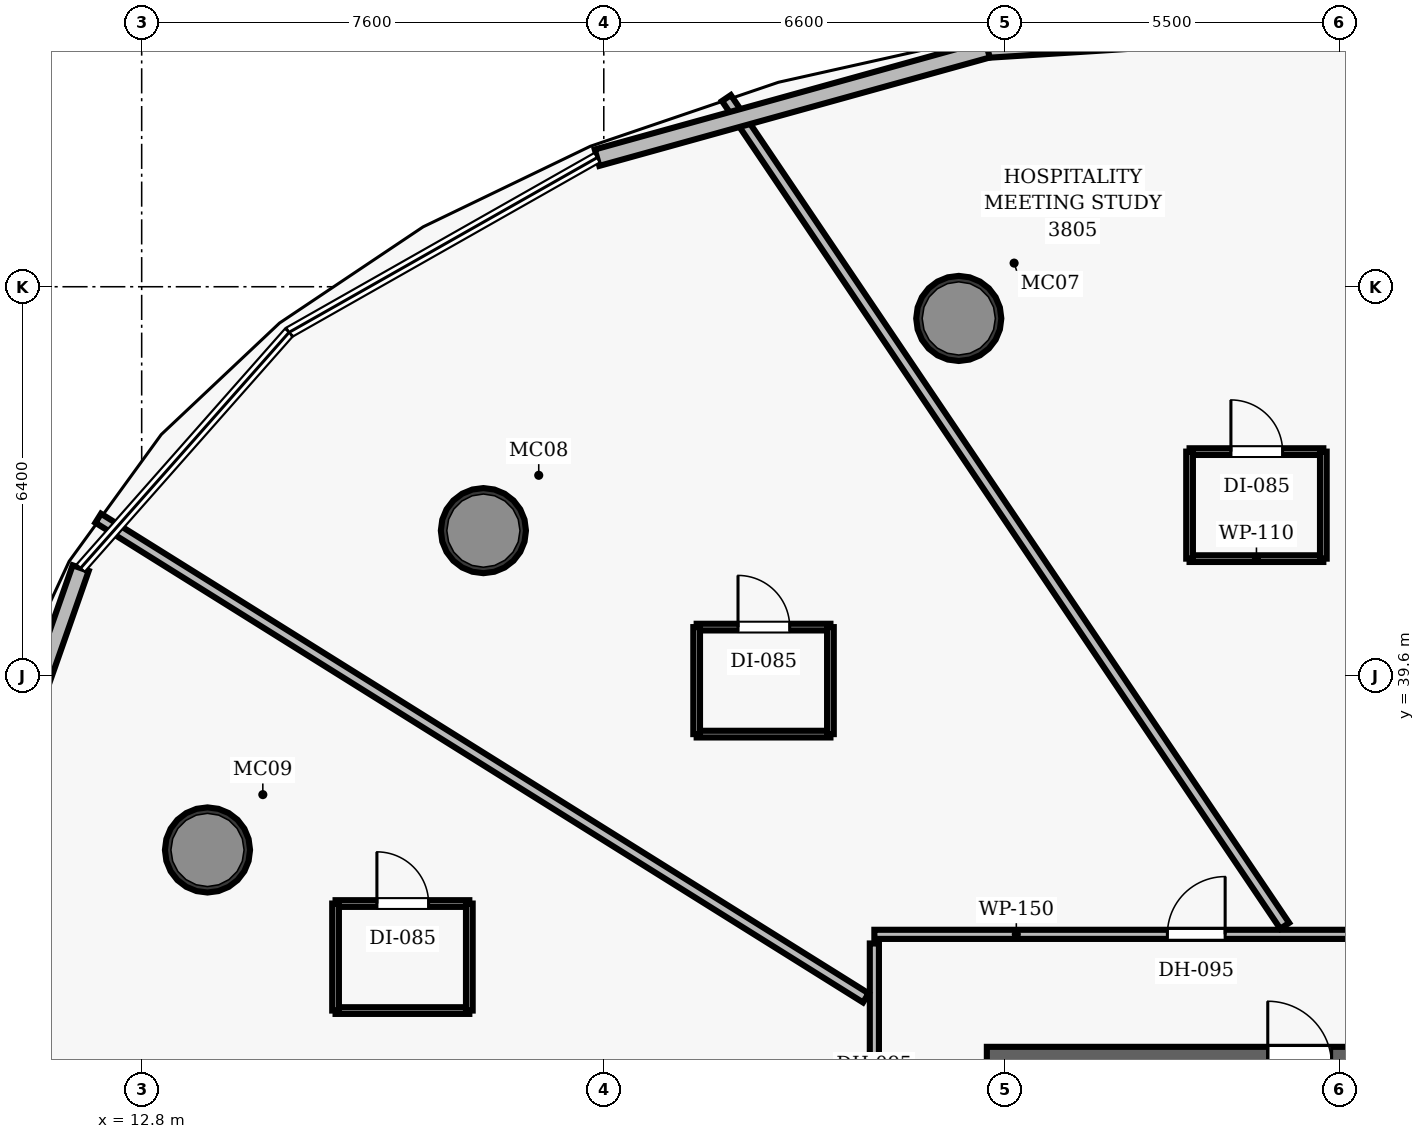
"""IFC4 building model, lengths in metres.
Left out: names, types, materials, properties, quantities, classifications, styles, units other than length and angle.
Written with IfcOpenShell. Run it as: python <this file> out.ifc"""

import sys

from ifc_helpers import new_model, si_unit, direction, frame, frame_2d, origin, origin_2d, place, context, subcontext, project, spatial, rectangle, hollow_circle, extrude, element, fill, save


model = new_model("IFC4")
c1 = context("Model", 3, precision=1e-05, world=origin(), true_north=direction((0.0, 1.0)))
c2 = subcontext(c1, "Body", "Model", "MODEL_VIEW")
j1 = project(units=[si_unit("LENGTHUNIT", "METRE"), si_unit("PLANEANGLEUNIT", "RADIAN")], contexts=[c1])
p1 = place(None, origin())
s1 = spatial("IfcSite", under=j1, at=p1, CompositionType="ELEMENT")
p2 = place(p1, origin())
s2 = spatial("IfcBuilding", under=s1, at=p2, CompositionType="ELEMENT")
p3 = place(p2, frame((0.0, 0.0, 151.8)))
s3 = spatial("IfcBuildingStorey", under=s2, at=p3, CompositionType="ELEMENT", Elevation=151.8)
p4 = place(p3, frame((26.7, 33.2, 0.0), z_axis=(0.0, 0.0, 1.0), x_axis=(1.0, 0.0, 0.0)))
e1 = element("IfcWall", 1, at=p4, inside=s3, PredefinedType="SHEAR", context=c2, shape_type="SweptSolid", body=[
    extrude(rectangle(XDim=22.6, YDim=0.6, at=frame_2d((11.3, 0.0))), origin(), (0.0, 0.0, 1.0), 3.5),
])
p5 = place(p4, frame((4.62, 0.0, 0.0)))
e2 = element("IfcOpeningElement", 2, at=p5, cuts=e1, PredefinedType="OPENING", context=c2, shape_type="SweptSolid", body=[
    extrude(rectangle(XDim=1.05, YDim=2.15, at=frame_2d((0.525, 1.075))), frame((0.0, 0.31, 0.0), z_axis=(0.0, -1.0, 0.0), x_axis=(1.0, 0.0, 0.0)), (0.0, 0.0, 1.0), 0.62),
])
p6 = place(p4, frame((14.52, 0.0, 0.0)))
e3 = element("IfcOpeningElement", 3, at=p6, cuts=e1, PredefinedType="OPENING", context=c2, shape_type="SweptSolid", body=[
    extrude(rectangle(XDim=1.05, YDim=2.15, at=frame_2d((0.525, 1.075))), frame((0.0, 0.31, 0.0), z_axis=(0.0, -1.0, 0.0), x_axis=(1.0, 0.0, 0.0)), (0.0, 0.0, 1.0), 0.62),
])
for number, where, z_axis, x_axis in (
    (4, (26.238, 45.479, 0.0), (0.0, 0.0, 1.0), (1.0, 0.0, 0.0)),
    (5, (18.42, 41.989, 0.0), (0.0, 0.0, 1.0), (1.0, 0.0, 0.0)),
    (6, (13.882, 36.738, 0.0), (0.0, 0.0, 1.0), (1.0, 0.0, 0.0)),
):
    element("IfcColumn", number, at=place(p3, frame(where, z_axis=z_axis, x_axis=x_axis)), inside=s3, PredefinedType="COLUMN", context=c2, shape_type="SweptSolid", body=[
        extrude(hollow_circle(Radius=0.7, WallThickness=0.055, at=origin_2d()), origin(), (0.0, 0.0, 1.0), 3.5),
    ])
p7 = place(p3, frame((24.85, 35.35, 0.0), z_axis=(0.0, 0.0, 1.0), x_axis=(1.0, 0.0, 0.0)))
e7 = element("IfcWall", 7, at=p7, inside=s3, PredefinedType="PARTITIONING", context=c2, shape_type="SweptSolid", body=[
    extrude(rectangle(XDim=26.0, YDim=0.15, at=frame_2d((13.0, 0.0))), origin(), (0.0, 0.0, 1.0), 2.675),
])
p8 = place(p7, frame((21.789, 0.0, 0.0)))
e8 = element("IfcOpeningElement", 8, at=p8, cuts=e7, PredefinedType="OPENING", context=c2, shape_type="SweptSolid", body=[
    extrude(rectangle(XDim=0.95, YDim=2.15, at=frame_2d((0.475, 1.075))), frame((0.0, 0.085, 0.0), z_axis=(0.0, -1.0, 0.0), x_axis=(1.0, 0.0, 0.0)), (0.0, 0.0, 1.0), 0.17),
])
p9 = place(p7, frame((16.151, 0.0, 0.0)))
e9 = element("IfcOpeningElement", 9, at=p9, cuts=e7, PredefinedType="OPENING", context=c2, shape_type="SweptSolid", body=[
    extrude(rectangle(XDim=0.95, YDim=2.15, at=frame_2d((0.475, 1.075))), frame((0.0, 0.085, 0.0), z_axis=(0.0, -1.0, 0.0), x_axis=(1.0, 0.0, 0.0)), (0.0, 0.0, 1.0), 0.17),
])
p10 = place(p7, frame((13.021, 0.0, 0.0)))
e10 = element("IfcOpeningElement", 10, at=p10, cuts=e7, PredefinedType="OPENING", context=c2, shape_type="SweptSolid", body=[
    extrude(rectangle(XDim=0.95, YDim=2.15, at=frame_2d((0.475, 1.075))), frame((0.0, 0.085, 0.0), z_axis=(0.0, -1.0, 0.0), x_axis=(1.0, 0.0, 0.0)), (0.0, 0.0, 1.0), 0.17),
])
p11 = place(p7, frame((9.972, 0.0, 0.0)))
e11 = element("IfcOpeningElement", 11, at=p11, cuts=e7, PredefinedType="OPENING", context=c2, shape_type="SweptSolid", body=[
    extrude(rectangle(XDim=0.95, YDim=2.15, at=frame_2d((0.475, 1.075))), frame((0.0, 0.085, 0.0), z_axis=(0.0, -1.0, 0.0), x_axis=(1.0, 0.0, 0.0)), (0.0, 0.0, 1.0), 0.17),
])
p12 = place(p7, frame((4.819, 0.0, 0.0)))
e12 = element("IfcOpeningElement", 12, at=p12, cuts=e7, PredefinedType="OPENING", context=c2, shape_type="SweptSolid", body=[
    extrude(rectangle(XDim=0.95, YDim=2.15, at=frame_2d((0.475, 1.075))), frame((0.0, 0.085, 0.0), z_axis=(0.0, -1.0, 0.0), x_axis=(1.0, 0.0, 0.0)), (0.0, 0.0, 1.0), 0.17),
])
p13 = place(p3, frame((24.85, 27.08, 0.0), z_axis=(0.0, 0.0, 1.0), x_axis=(0.0, 1.0, 0.0)))
e13 = element("IfcWall", 13, at=p13, inside=s3, PredefinedType="PARTITIONING", context=c2, shape_type="SweptSolid", body=[
    extrude(rectangle(XDim=8.12, YDim=0.15, at=frame_2d((4.06, 0.0))), origin(), (0.0, 0.0, 1.0), 2.675),
])
p14 = place(p13, frame((4.58, 0.0, 0.0)))
e14 = element("IfcOpeningElement", 14, at=p14, cuts=e13, PredefinedType="OPENING", context=c2, shape_type="SweptSolid", body=[
    extrude(rectangle(XDim=0.95, YDim=2.15, at=frame_2d((0.475, 1.075))), frame((0.0, 0.085, 0.0), z_axis=(0.0, -1.0, 0.0), x_axis=(1.0, 0.0, 0.0)), (0.0, 0.0, 1.0), 0.17),
])
p15 = place(p3, frame((31.599, 35.49, 0.0), z_axis=(0.0, 0.0, 1.0), x_axis=(-0.559190390753, 0.829039267399, 0.0)))
e15 = element("IfcWall", 15, at=p15, inside=s3, PredefinedType="PARTITIONING", context=c2, shape_type="SweptSolid", body=[
    extrude(rectangle(XDim=16.42, YDim=0.175, at=frame_2d((8.21, 0.0))), origin(), (0.0, 0.0, 1.0), 2.675),
])
p16 = place(p3, frame((24.71, 34.304, 0.0), z_axis=(0.0, 0.0, 1.0), x_axis=(-0.848045288599, 0.529923757237, 0.0)))
e16 = element("IfcWall", 16, at=p16, inside=s3, PredefinedType="PARTITIONING", context=c2, shape_type="SweptSolid", body=[
    extrude(rectangle(XDim=14.887, YDim=0.175, at=frame_2d((7.443, 0.0))), origin(), (0.0, 0.0, 1.0), 2.675),
])
p17 = place(p3, frame((30.034, 41.529, 0.0), z_axis=(0.0, 0.0, 1.0), x_axis=(1.0, 0.0, 0.0)))
e17 = element("IfcWall", 17, at=p17, inside=s3, PredefinedType="PARTITIONING", context=c2, shape_type="SweptSolid", body=[
    extrude(rectangle(XDim=2.2, YDim=0.11, at=frame_2d((1.1, 0.0))), origin(), (0.0, 0.0, 1.0), 2.675),
])
p18 = place(p3, frame((30.034, 43.289, 0.0), z_axis=(0.0, 0.0, 1.0), x_axis=(1.0, 0.0, 0.0)))
e18 = element("IfcWall", 18, at=p18, inside=s3, PredefinedType="PARTITIONING", context=c2, shape_type="SweptSolid", body=[
    extrude(rectangle(XDim=2.2, YDim=0.11, at=frame_2d((1.1, 0.0))), origin(), (0.0, 0.0, 1.0), 2.675),
])
p19 = place(p18, frame((0.68, 0.0, 0.0)))
e19 = element("IfcOpeningElement", 19, at=p19, cuts=e18, PredefinedType="OPENING", context=c2, shape_type="SweptSolid", body=[
    extrude(rectangle(XDim=0.85, YDim=2.1, at=frame_2d((0.425, 1.05))), frame((0.0, 0.065, 0.0), z_axis=(0.0, -1.0, 0.0), x_axis=(1.0, 0.0, 0.0)), (0.0, 0.0, 1.0), 0.13),
])
for number, where, z_axis, x_axis in (
    (20, (30.034, 41.529, 0.0), (0.0, 0.0, 1.0), (0.0, 1.0, 0.0)),
    (21, (32.234, 41.529, 0.0), (0.0, 0.0, 1.0), (0.0, 1.0, 0.0)),
):
    element("IfcWall", number, at=place(p3, frame(where, z_axis=z_axis, x_axis=x_axis)), inside=s3, PredefinedType="PARTITIONING", context=c2, shape_type="SweptSolid", body=[
        extrude(rectangle(XDim=1.76, YDim=0.11, at=frame_2d((0.88, 0.0))), origin(), (0.0, 0.0, 1.0), 2.675),
    ])
p20 = place(p3, frame((21.927, 38.643, 0.0), z_axis=(0.0, 0.0, 1.0), x_axis=(1.0, 0.0, 0.0)))
e22 = element("IfcWall", 22, at=p20, inside=s3, PredefinedType="PARTITIONING", context=c2, shape_type="SweptSolid", body=[
    extrude(rectangle(XDim=2.2, YDim=0.11, at=frame_2d((1.1, 0.0))), origin(), (0.0, 0.0, 1.0), 2.675),
])
p21 = place(p3, frame((21.927, 40.403, 0.0), z_axis=(0.0, 0.0, 1.0), x_axis=(1.0, 0.0, 0.0)))
e23 = element("IfcWall", 23, at=p21, inside=s3, PredefinedType="PARTITIONING", context=c2, shape_type="SweptSolid", body=[
    extrude(rectangle(XDim=2.2, YDim=0.11, at=frame_2d((1.1, 0.0))), origin(), (0.0, 0.0, 1.0), 2.675),
])
p22 = place(p21, frame((0.68, 0.0, 0.0)))
e24 = element("IfcOpeningElement", 24, at=p22, cuts=e23, PredefinedType="OPENING", context=c2, shape_type="SweptSolid", body=[
    extrude(rectangle(XDim=0.85, YDim=2.1, at=frame_2d((0.425, 1.05))), frame((0.0, 0.065, 0.0), z_axis=(0.0, -1.0, 0.0), x_axis=(1.0, 0.0, 0.0)), (0.0, 0.0, 1.0), 0.13),
])
for number, where, z_axis, x_axis in (
    (25, (21.927, 38.643, 0.0), (0.0, 0.0, 1.0), (0.0, 1.0, 0.0)),
    (26, (24.127, 38.643, 0.0), (0.0, 0.0, 1.0), (0.0, 1.0, 0.0)),
):
    element("IfcWall", number, at=place(p3, frame(where, z_axis=z_axis, x_axis=x_axis)), inside=s3, PredefinedType="PARTITIONING", context=c2, shape_type="SweptSolid", body=[
        extrude(rectangle(XDim=1.76, YDim=0.11, at=frame_2d((0.88, 0.0))), origin(), (0.0, 0.0, 1.0), 2.675),
    ])
p23 = place(p3, frame((15.989, 34.097, 0.0), z_axis=(0.0, 0.0, 1.0), x_axis=(1.0, 0.0, 0.0)))
e27 = element("IfcWall", 27, at=p23, inside=s3, PredefinedType="PARTITIONING", context=c2, shape_type="SweptSolid", body=[
    extrude(rectangle(XDim=2.2, YDim=0.11, at=frame_2d((1.1, 0.0))), origin(), (0.0, 0.0, 1.0), 2.675),
])
p24 = place(p3, frame((15.989, 35.857, 0.0), z_axis=(0.0, 0.0, 1.0), x_axis=(1.0, 0.0, 0.0)))
e28 = element("IfcWall", 28, at=p24, inside=s3, PredefinedType="PARTITIONING", context=c2, shape_type="SweptSolid", body=[
    extrude(rectangle(XDim=2.2, YDim=0.11, at=frame_2d((1.1, 0.0))), origin(), (0.0, 0.0, 1.0), 2.675),
])
p25 = place(p24, frame((0.68, 0.0, 0.0)))
e29 = element("IfcOpeningElement", 29, at=p25, cuts=e28, PredefinedType="OPENING", context=c2, shape_type="SweptSolid", body=[
    extrude(rectangle(XDim=0.85, YDim=2.1, at=frame_2d((0.425, 1.05))), frame((0.0, 0.065, 0.0), z_axis=(0.0, -1.0, 0.0), x_axis=(1.0, 0.0, 0.0)), (0.0, 0.0, 1.0), 0.13),
])
for number, where, z_axis, x_axis in (
    (30, (15.989, 34.097, 0.0), (0.0, 0.0, 1.0), (0.0, 1.0, 0.0)),
    (31, (18.189, 34.097, 0.0), (0.0, 0.0, 1.0), (0.0, 1.0, 0.0)),
):
    element("IfcWall", number, at=place(p3, frame(where, z_axis=z_axis, x_axis=x_axis)), inside=s3, PredefinedType="PARTITIONING", context=c2, shape_type="SweptSolid", body=[
        extrude(rectangle(XDim=1.76, YDim=0.11, at=frame_2d((0.88, 0.0))), origin(), (0.0, 0.0, 1.0), 2.675),
    ])
p26 = place(p3, frame((26.711, 49.905, 0.0), z_axis=(0.0, 0.0, 1.0), x_axis=(0.997998007076, 0.063245378266, 0.0)))
e32 = element("IfcWall", 32, at=p26, inside=s3, PredefinedType="SOLIDWALL", context=c2, shape_type="SweptSolid", body=[
    extrude(rectangle(XDim=7.292, YDim=0.28, at=frame_2d((3.646, 0.0))), origin(), (0.0, 0.0, 1.0), 3.26),
])
p27 = place(p3, frame((20.289, 48.122, 0.0), z_axis=(0.0, 0.0, 1.0), x_axis=(0.963574041705, 0.267441706082, 0.0)))
e33 = element("IfcWall", 33, at=p27, inside=s3, PredefinedType="SOLIDWALL", context=c2, shape_type="SweptSolid", body=[
    extrude(rectangle(XDim=6.665, YDim=0.28, at=frame_2d((3.333, 0.0))), origin(), (0.0, 0.0, 1.0), 3.26),
])
p28 = place(p3, frame((10.085, 36.49, 0.0), z_axis=(0.0, 0.0, 1.0), x_axis=(0.330896813474, 0.943666942747, 0.0)))
e34 = element("IfcWall", 34, at=p28, inside=s3, PredefinedType="SOLIDWALL", context=c2, shape_type="SweptSolid", body=[
    extrude(rectangle(XDim=5.174, YDim=0.28, at=frame_2d((2.587, 0.0))), origin(), (0.0, 0.0, 1.0), 3.26),
])
p29 = place(p19, origin())
e35 = element("IfcDoor", 35, at=p29, inside=s3, OperationType="SINGLE_SWING_LEFT", PredefinedType="DOOR", context=c2, shape_type="SweptSolid", body=[
    extrude(rectangle(XDim=0.85, YDim=2.1, at=frame_2d((0.425, 1.05))), frame((0.0, 0.025, 0.0), z_axis=(0.0, -1.0, 0.0), x_axis=(1.0, 0.0, 0.0)), (0.0, 0.0, 1.0), 0.05),
])
fill(e19, e35)
p30 = place(p12, origin())
e36 = element("IfcDoor", 36, at=p30, inside=s3, OperationType="SINGLE_SWING_RIGHT", PredefinedType="DOOR", context=c2, shape_type="SweptSolid", body=[
    extrude(rectangle(XDim=0.95, YDim=2.15, at=frame_2d((0.475, 1.075))), frame((0.0, 0.025, 0.0), z_axis=(0.0, -1.0, 0.0), x_axis=(1.0, 0.0, 0.0)), (0.0, 0.0, 1.0), 0.05),
])
fill(e12, e36)
p31 = place(p22, origin())
e37 = element("IfcDoor", 37, at=p31, inside=s3, OperationType="SINGLE_SWING_LEFT", PredefinedType="DOOR", context=c2, shape_type="SweptSolid", body=[
    extrude(rectangle(XDim=0.85, YDim=2.1, at=frame_2d((0.425, 1.05))), frame((0.0, 0.025, 0.0), z_axis=(0.0, -1.0, 0.0), x_axis=(1.0, 0.0, 0.0)), (0.0, 0.0, 1.0), 0.05),
])
fill(e24, e37)
p32 = place(p25, origin())
e38 = element("IfcDoor", 38, at=p32, inside=s3, OperationType="SINGLE_SWING_LEFT", PredefinedType="DOOR", context=c2, shape_type="SweptSolid", body=[
    extrude(rectangle(XDim=0.85, YDim=2.1, at=frame_2d((0.425, 1.05))), frame((0.0, 0.025, 0.0), z_axis=(0.0, -1.0, 0.0), x_axis=(1.0, 0.0, 0.0)), (0.0, 0.0, 1.0), 0.05),
])
fill(e29, e38)
save(model, sys.argv[1])
